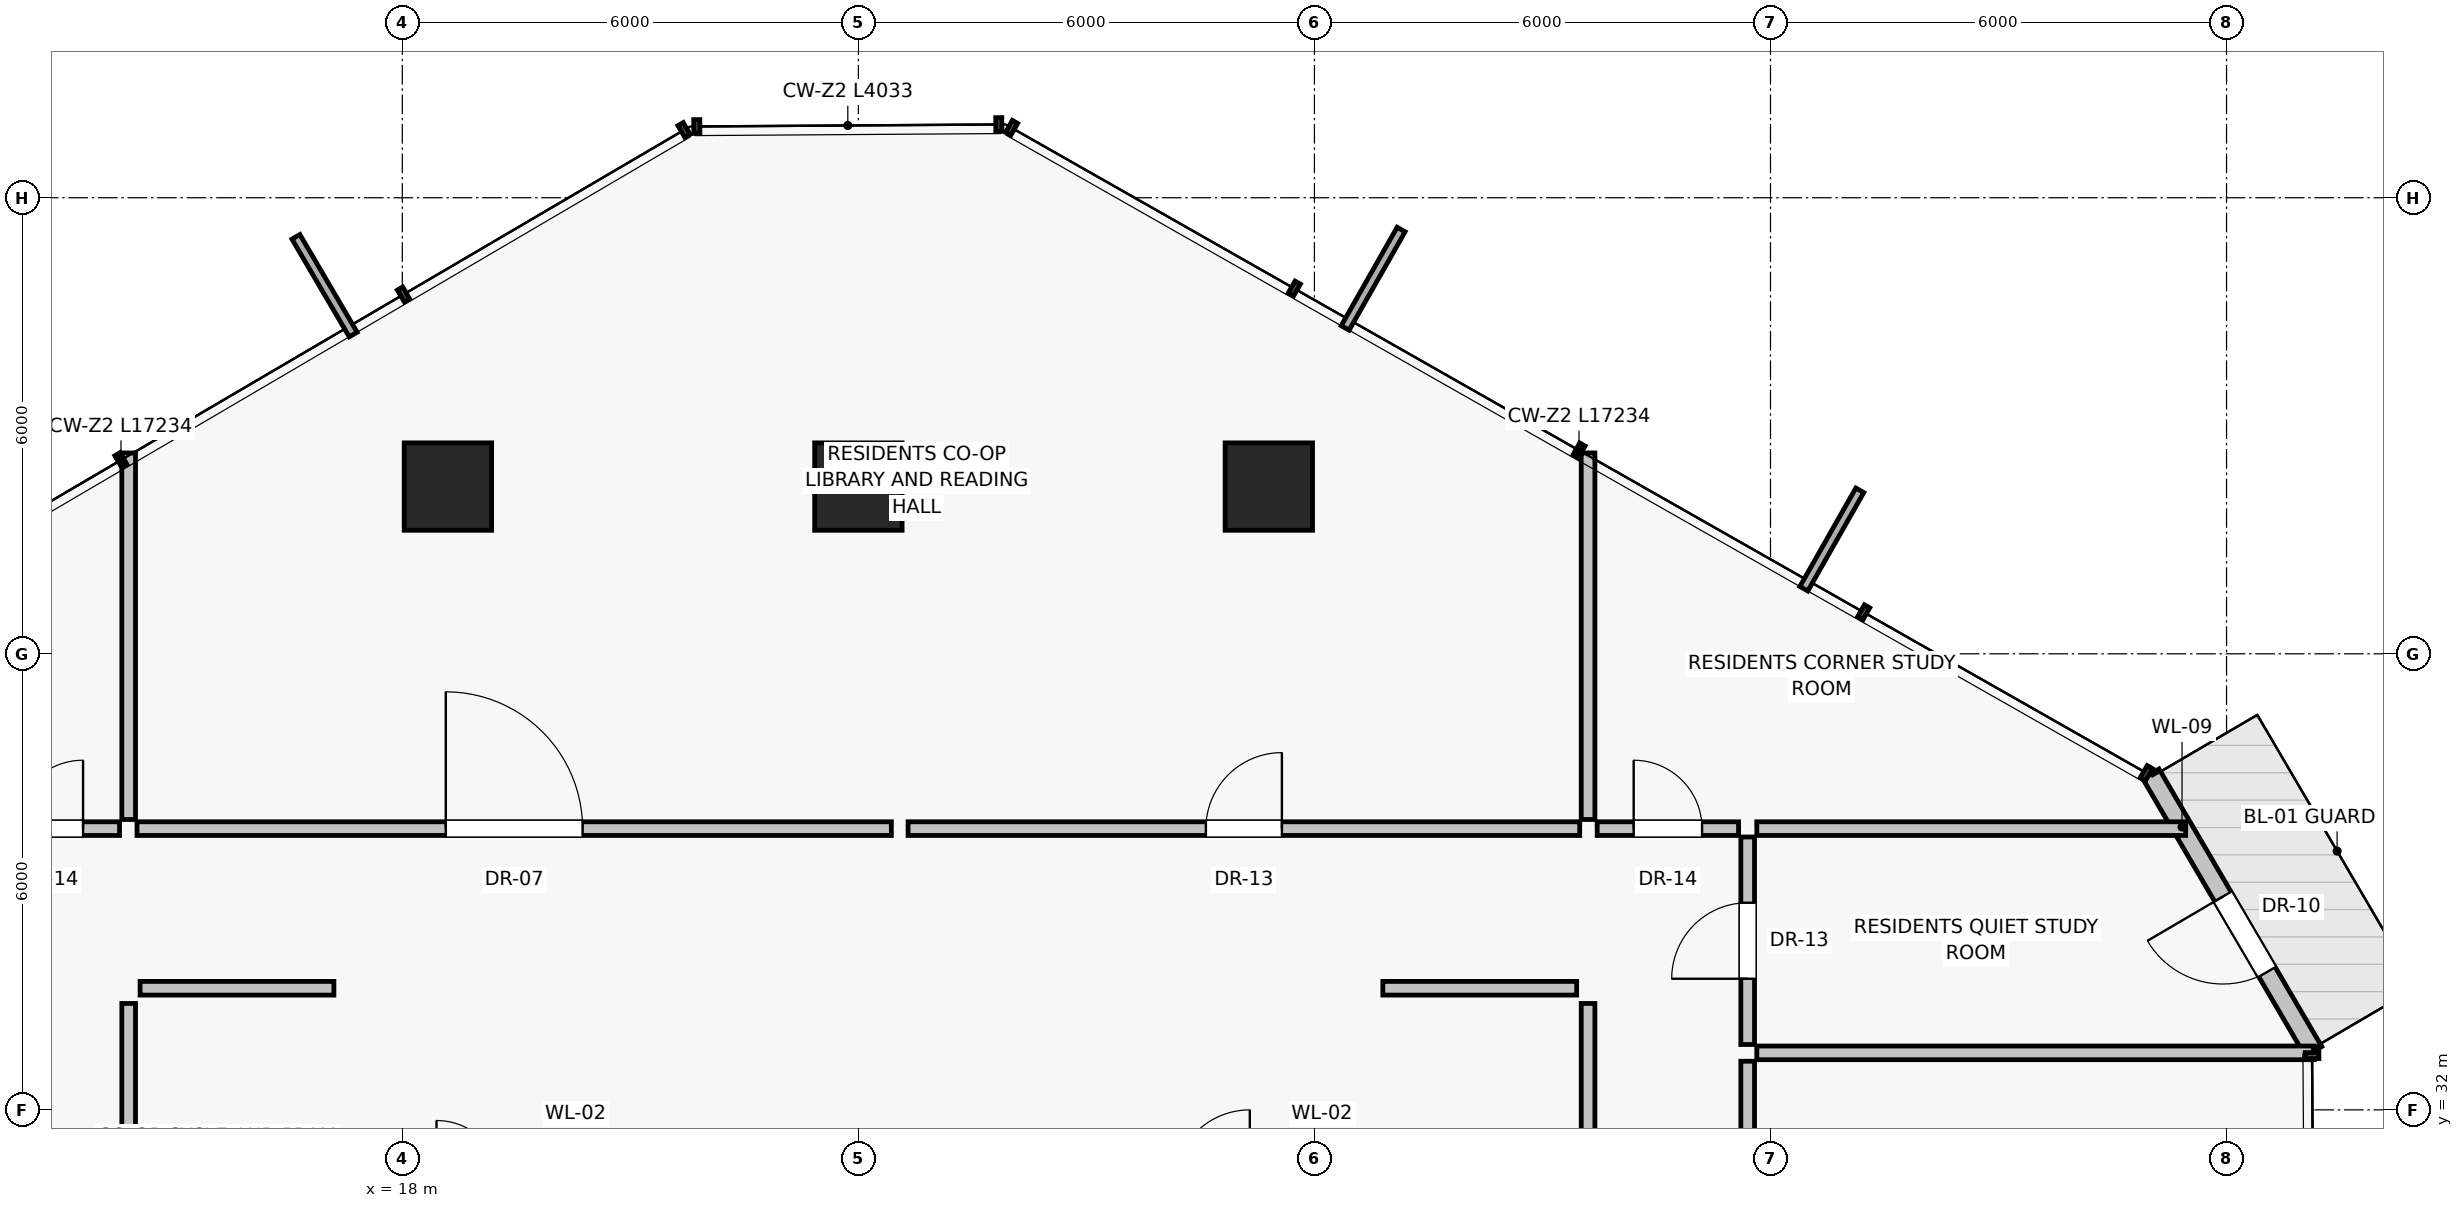
"""IFC4 building model, lengths in metres.
Left out: names, types, materials, properties, quantities, classifications, styles, units other than length and angle.
Written with IfcOpenShell. Run it as: python <this file> out.ifc"""

import sys

from ifc_helpers import new_model, si_unit, direction, frame, frame_2d, origin, origin_2d, place, context, subcontext, project, spatial, rectangle, extrude, source, transform, mapped, element, fill, save


model = new_model("IFC4")
c1 = context("Model", 3, precision=1e-05, world=origin(), true_north=direction((0.0, 1.0)))
c2 = subcontext(c1, "Body", "Model", "MODEL_VIEW")
j1 = project(units=[si_unit("LENGTHUNIT", "METRE"), si_unit("PLANEANGLEUNIT", "RADIAN")], contexts=[c1])
p1 = place(None, origin())
s1 = spatial("IfcSite", under=j1, at=p1, CompositionType="ELEMENT")
p2 = place(p1, origin())
s2 = spatial("IfcBuilding", under=s1, at=p2, CompositionType="ELEMENT")
p3 = place(p2, frame((0.0, 0.0, 129.5)))
s3 = spatial("IfcBuildingStorey", under=s2, at=p3, CompositionType="ELEMENT", Elevation=129.5)
for number, where, z_axis, x_axis in (
    (1, (29.4, 40.2, 0.0), (0.0, 0.0, 1.0), (1.0, 0.0, 0.0)),
    (2, (24.0, 40.2, 0.0), (0.0, 0.0, 1.0), (1.0, 0.0, 0.0)),
    (3, (18.6, 40.2, 0.0), (0.0, 0.0, 1.0), (1.0, 0.0, 0.0)),
):
    element("IfcColumn", number, at=place(p3, frame(where, z_axis=z_axis, x_axis=x_axis)), inside=s3, PredefinedType="COLUMN", context=c2, shape_type="SweptSolid", body=[
        extrude(rectangle(XDim=1.15, YDim=1.15, at=origin_2d()), origin(), (0.0, 0.0, 1.0), 3.25),
    ])
p4 = place(p3, frame((43.145, 32.77, 0.0), z_axis=(0.0, 0.0, 1.0), x_axis=(-0.505741701413, 0.862684954924, 0.0)))
e4 = element("IfcWall", 4, at=p4, inside=s3, PredefinedType="SOLIDWALL", context=c2, shape_type="SweptSolid", body=[
    extrude(rectangle(XDim=4.233, YDim=0.25, at=frame_2d((2.117, 0.0))), origin(), (0.0, 0.0, 1.0), 3.0),
])
p5 = place(p4, frame((1.21, 0.0, 0.0)))
e5 = element("IfcOpeningElement", 5, at=p5, cuts=e4, PredefinedType="OPENING", context=c2, shape_type="SweptSolid", body=[
    extrude(rectangle(XDim=1.15, YDim=2.25, at=frame_2d((0.575, 1.125))), frame((0.0, 0.135, 0.0), z_axis=(0.0, -1.0, 0.0), x_axis=(1.0, 0.0, 0.0)), (0.0, 0.0, 1.0), 0.27),
])
p6 = place(p3, frame((14.4, 24.2, 0.0), z_axis=(0.0, 0.0, 1.0), x_axis=(0.0, 1.0, 0.0)))
e6 = element("IfcWall", 6, at=p6, inside=s3, PredefinedType="PARTITIONING", context=c2, shape_type="SweptSolid", body=[
    extrude(rectangle(XDim=9.2, YDim=0.18, at=frame_2d((4.6, 0.0))), origin(), (0.0, 0.0, 1.0), 3.0),
])
p7 = place(p6, frame((3.8, 0.0, 0.0)))
e7 = element("IfcOpeningElement", 7, at=p7, cuts=e6, PredefinedType="OPENING", context=c2, shape_type="SweptSolid", body=[
    extrude(rectangle(XDim=0.9, YDim=2.01, at=frame_2d((0.45, 1.005))), frame((0.0, 0.1, 0.0), z_axis=(0.0, -1.0, 0.0), x_axis=(1.0, 0.0, 0.0)), (0.0, 0.0, 1.0), 0.2),
])
p8 = place(p3, frame((33.6, 24.2, 0.0), z_axis=(0.0, 0.0, 1.0), x_axis=(0.0, 1.0, 0.0)))
e8 = element("IfcWall", 8, at=p8, inside=s3, PredefinedType="PARTITIONING", context=c2, shape_type="SweptSolid", body=[
    extrude(rectangle(XDim=9.2, YDim=0.18, at=frame_2d((4.6, 0.0))), origin(), (0.0, 0.0, 1.0), 3.0),
])
p9 = place(p8, frame((3.8, 0.0, 0.0)))
e9 = element("IfcOpeningElement", 9, at=p9, cuts=e8, PredefinedType="OPENING", context=c2, shape_type="SweptSolid", body=[
    extrude(rectangle(XDim=0.9, YDim=2.01, at=frame_2d((0.45, 1.005))), frame((0.0, 0.1, 0.0), z_axis=(0.0, -1.0, 0.0), x_axis=(1.0, 0.0, 0.0)), (0.0, 0.0, 1.0), 0.2),
])
for number, where, z_axis, x_axis in (
    (10, (14.55, 33.6, 0.0), (0.0, 0.0, 1.0), (1.0, 0.0, 0.0)),
    (11, (30.9, 33.6, 0.0), (0.0, 0.0, 1.0), (1.0, 0.0, 0.0)),
):
    element("IfcWall", number, at=place(p3, frame(where, z_axis=z_axis, x_axis=x_axis)), inside=s3, PredefinedType="PARTITIONING", context=c2, shape_type="SweptSolid", body=[
        extrude(rectangle(XDim=2.55, YDim=0.18, at=frame_2d((1.275, 0.0))), origin(), (0.0, 0.0, 1.0), 3.0),
    ])
for number, where, z_axis, x_axis in (
    (12, (14.4, 35.82, 0.0), (0.0, 0.0, 1.0), (0.0, 1.0, 0.0)),
    (13, (33.6, 35.82, 0.0), (0.0, 0.0, 1.0), (0.0, 1.0, 0.0)),
):
    element("IfcWall", number, at=place(p3, frame(where, z_axis=z_axis, x_axis=x_axis)), inside=s3, PredefinedType="PARTITIONING", context=c2, shape_type="SweptSolid", body=[
        extrude(rectangle(XDim=4.823, YDim=0.18, at=frame_2d((2.411, 0.0))), origin(), (0.0, 0.0, 1.0), 3.0),
    ])
p10 = place(p3, frame((14.51, 35.7, 0.0), z_axis=(0.0, 0.0, 1.0), x_axis=(1.0, 0.0, 0.0)))
e14 = element("IfcWall", 14, at=p10, inside=s3, PredefinedType="PARTITIONING", context=c2, shape_type="SweptSolid", body=[
    extrude(rectangle(XDim=9.924, YDim=0.18, at=frame_2d((4.962, 0.0))), origin(), (0.0, 0.0, 1.0), 2.58),
])
p11 = place(p10, frame((4.062, 0.0, 0.0)))
e15 = element("IfcOpeningElement", 15, at=p11, cuts=e14, PredefinedType="OPENING", context=c2, shape_type="SweptSolid", body=[
    extrude(rectangle(XDim=1.8, YDim=2.25, at=frame_2d((0.9, 1.125))), frame((0.0, 0.1, 0.0), z_axis=(0.0, -1.0, 0.0), x_axis=(1.0, 0.0, 0.0)), (0.0, 0.0, 1.0), 0.2),
])
p12 = place(p3, frame((24.654, 35.7, 0.0), z_axis=(0.0, 0.0, 1.0), x_axis=(1.0, 0.0, 0.0)))
e16 = element("IfcWall", 16, at=p12, inside=s3, PredefinedType="PARTITIONING", context=c2, shape_type="SweptSolid", body=[
    extrude(rectangle(XDim=8.836, YDim=0.18, at=frame_2d((4.418, 0.0))), origin(), (0.0, 0.0, 1.0), 2.58),
])
p13 = place(p12, frame((3.918, 0.0, 0.0)))
e17 = element("IfcOpeningElement", 17, at=p13, cuts=e16, PredefinedType="OPENING", context=c2, shape_type="SweptSolid", body=[
    extrude(rectangle(XDim=1.0, YDim=2.01, at=frame_2d((0.5, 1.005))), frame((0.0, 0.1, 0.0), z_axis=(0.0, -1.0, 0.0), x_axis=(1.0, 0.0, 0.0)), (0.0, 0.0, 1.0), 0.2),
])
p14 = place(p3, frame((35.82, 35.7, 0.0), z_axis=(0.0, 0.0, 1.0), x_axis=(1.0, 0.0, 0.0)))
e18 = element("IfcWall", 18, at=p14, inside=s3, PredefinedType="PARTITIONING", context=c2, shape_type="SweptSolid", body=[
    extrude(rectangle(XDim=5.642, YDim=0.18, at=frame_2d((2.821, 0.0))), origin(), (0.0, 0.0, 1.0), 3.0),
])
p15 = place(p3, frame((35.7, 32.86, 0.0), z_axis=(0.0, 0.0, 1.0), x_axis=(0.0, 1.0, 0.0)))
e19 = element("IfcWall", 19, at=p15, inside=s3, PredefinedType="PARTITIONING", context=c2, shape_type="SweptSolid", body=[
    extrude(rectangle(XDim=2.73, YDim=0.18, at=frame_2d((1.365, 0.0))), origin(), (0.0, 0.0, 1.0), 3.0),
])
p16 = place(p15, frame((0.865, 0.0, 0.0)))
e20 = element("IfcOpeningElement", 20, at=p16, cuts=e19, PredefinedType="OPENING", context=c2, shape_type="SweptSolid", body=[
    extrude(rectangle(XDim=1.0, YDim=2.01, at=frame_2d((0.5, 1.005))), frame((0.0, 0.1, 0.0), z_axis=(0.0, -1.0, 0.0), x_axis=(1.0, 0.0, 0.0)), (0.0, 0.0, 1.0), 0.2),
])
p17 = place(p3, frame((35.82, 32.75, 0.0), z_axis=(0.0, 0.0, 1.0), x_axis=(1.0, 0.0, 0.0)))
e21 = element("IfcWall", 21, at=p17, inside=s3, PredefinedType="PARTITIONING", context=c2, shape_type="SweptSolid", body=[
    extrude(rectangle(XDim=7.335, YDim=0.18, at=frame_2d((3.667, 0.0))), origin(), (0.0, 0.0, 1.0), 3.0),
])
p18 = place(p3, frame((35.7, 28.262, 0.0), z_axis=(0.0, 0.0, 1.0), x_axis=(0.0, 1.0, 0.0)))
e22 = element("IfcWall", 22, at=p18, inside=s3, PredefinedType="PARTITIONING", context=c2, shape_type="SweptSolid", body=[
    extrude(rectangle(XDim=4.378, YDim=0.18, at=frame_2d((2.189, 0.0))), origin(), (0.0, 0.0, 1.0), 2.58),
])
p19 = place(p18, frame((2.441, 0.0, 0.0)))
e23 = element("IfcOpeningElement", 23, at=p19, cuts=e22, PredefinedType="OPENING", context=c2, shape_type="SweptSolid", body=[
    extrude(rectangle(XDim=0.95, YDim=2.02, at=frame_2d((0.475, 1.01))), frame((0.0, 0.1, 0.0), z_axis=(0.0, -1.0, 0.0), x_axis=(1.0, 0.0, 0.0)), (0.0, 0.0, 1.0), 0.2),
])
p20 = place(p3, frame((12.42, 35.7, 0.0), z_axis=(0.0, 0.0, 1.0), x_axis=(1.0, 0.0, 0.0)))
e24 = element("IfcWall", 24, at=p20, inside=s3, PredefinedType="PARTITIONING", context=c2, shape_type="SweptSolid", body=[
    extrude(rectangle(XDim=1.86, YDim=0.18, at=frame_2d((0.93, 0.0))), origin(), (0.0, 0.0, 1.0), 3.0),
])
p21 = place(p20, frame((0.48, 0.0, 0.0)))
e25 = element("IfcOpeningElement", 25, at=p21, cuts=e24, PredefinedType="OPENING", context=c2, shape_type="SweptSolid", body=[
    extrude(rectangle(XDim=0.9, YDim=2.01, at=frame_2d((0.45, 1.005))), frame((0.0, 0.1, 0.0), z_axis=(0.0, -1.0, 0.0), x_axis=(1.0, 0.0, 0.0)), (0.0, 0.0, 1.0), 0.2),
])
p22 = place(p3, frame((33.72, 35.7, 0.0), z_axis=(0.0, 0.0, 1.0), x_axis=(1.0, 0.0, 0.0)))
e26 = element("IfcWall", 26, at=p22, inside=s3, PredefinedType="PARTITIONING", context=c2, shape_type="SweptSolid", body=[
    extrude(rectangle(XDim=1.86, YDim=0.18, at=frame_2d((0.93, 0.0))), origin(), (0.0, 0.0, 1.0), 3.0),
])
p23 = place(p22, frame((0.48, 0.0, 0.0)))
e27 = element("IfcOpeningElement", 27, at=p23, cuts=e26, PredefinedType="OPENING", context=c2, shape_type="SweptSolid", body=[
    extrude(rectangle(XDim=0.9, YDim=2.01, at=frame_2d((0.45, 1.005))), frame((0.0, 0.1, 0.0), z_axis=(0.0, -1.0, 0.0), x_axis=(1.0, 0.0, 0.0)), (0.0, 0.0, 1.0), 0.2),
])
m1 = source(origin(), c2, "Body", "SweptSolid", [
    extrude(rectangle(XDim=1.15, YDim=2.25, at=frame_2d((0.575, 1.125))), frame((0.0, 0.025, 0.0), z_axis=(0.0, -1.0, 0.0), x_axis=(1.0, 0.0, 0.0)), (0.0, 0.0, 1.0), 0.05),
])
p24 = place(p5, frame((1.15, 0.0, 0.0), z_axis=(0.0, 0.0, 1.0), x_axis=(-1.0, 0.0, 0.0)))
e28 = element("IfcDoor", 28, at=p24, inside=s3, OperationType="SINGLE_SWING_RIGHT", PredefinedType="DOOR", context=c2, shape_type="MappedRepresentation", body=[
    mapped(m1, transform((0.0, 0.0, 0.0), scale=1.0)),
])
fill(e5, e28)
m2 = source(origin(), c2, "Body", "SweptSolid", [
    extrude(rectangle(XDim=1.8, YDim=2.25, at=frame_2d((0.9, 1.125))), frame((0.0, 0.025, 0.0), z_axis=(0.0, -1.0, 0.0), x_axis=(1.0, 0.0, 0.0)), (0.0, 0.0, 1.0), 0.05),
])
p25 = place(p11, origin())
e29 = element("IfcDoor", 29, at=p25, inside=s3, OperationType="SINGLE_SWING_LEFT", PredefinedType="DOOR", context=c2, shape_type="MappedRepresentation", body=[
    mapped(m2, transform((0.0, 0.0, 0.0), scale=1.0)),
])
fill(e15, e29)
m3 = source(origin(), c2, "Body", "SweptSolid", [
    extrude(rectangle(XDim=1.0, YDim=2.01, at=frame_2d((0.5, 1.005))), frame((0.0, 0.025, 0.0), z_axis=(0.0, -1.0, 0.0), x_axis=(1.0, 0.0, 0.0)), (0.0, 0.0, 1.0), 0.05),
])
p26 = place(p13, origin())
e30 = element("IfcDoor", 30, at=p26, inside=s3, OperationType="SINGLE_SWING_RIGHT", PredefinedType="DOOR", context=c2, shape_type="MappedRepresentation", body=[
    mapped(m3, transform((0.0, 0.0, 0.0), scale=1.0)),
])
fill(e17, e30)
p27 = place(p16, origin())
e31 = element("IfcDoor", 31, at=p27, inside=s3, OperationType="SINGLE_SWING_LEFT", PredefinedType="DOOR", context=c2, shape_type="MappedRepresentation", body=[
    mapped(m3, transform((0.0, 0.0, 0.0), scale=1.0)),
])
fill(e20, e31)
m4 = source(origin(), c2, "Body", "SweptSolid", [
    extrude(rectangle(XDim=0.9, YDim=2.01, at=frame_2d((0.45, 1.005))), frame((0.0, 0.025, 0.0), z_axis=(0.0, -1.0, 0.0), x_axis=(1.0, 0.0, 0.0)), (0.0, 0.0, 1.0), 0.05),
])
p28 = place(p21, origin())
e32 = element("IfcDoor", 32, at=p28, inside=s3, OperationType="SINGLE_SWING_RIGHT", PredefinedType="DOOR", context=c2, shape_type="MappedRepresentation", body=[
    mapped(m4, transform((0.0, 0.0, 0.0), scale=1.0)),
])
fill(e25, e32)
p29 = place(p23, origin())
e33 = element("IfcDoor", 33, at=p29, inside=s3, OperationType="SINGLE_SWING_LEFT", PredefinedType="DOOR", context=c2, shape_type="MappedRepresentation", body=[
    mapped(m4, transform((0.0, 0.0, 0.0), scale=1.0)),
])
fill(e27, e33)
save(model, sys.argv[1])
